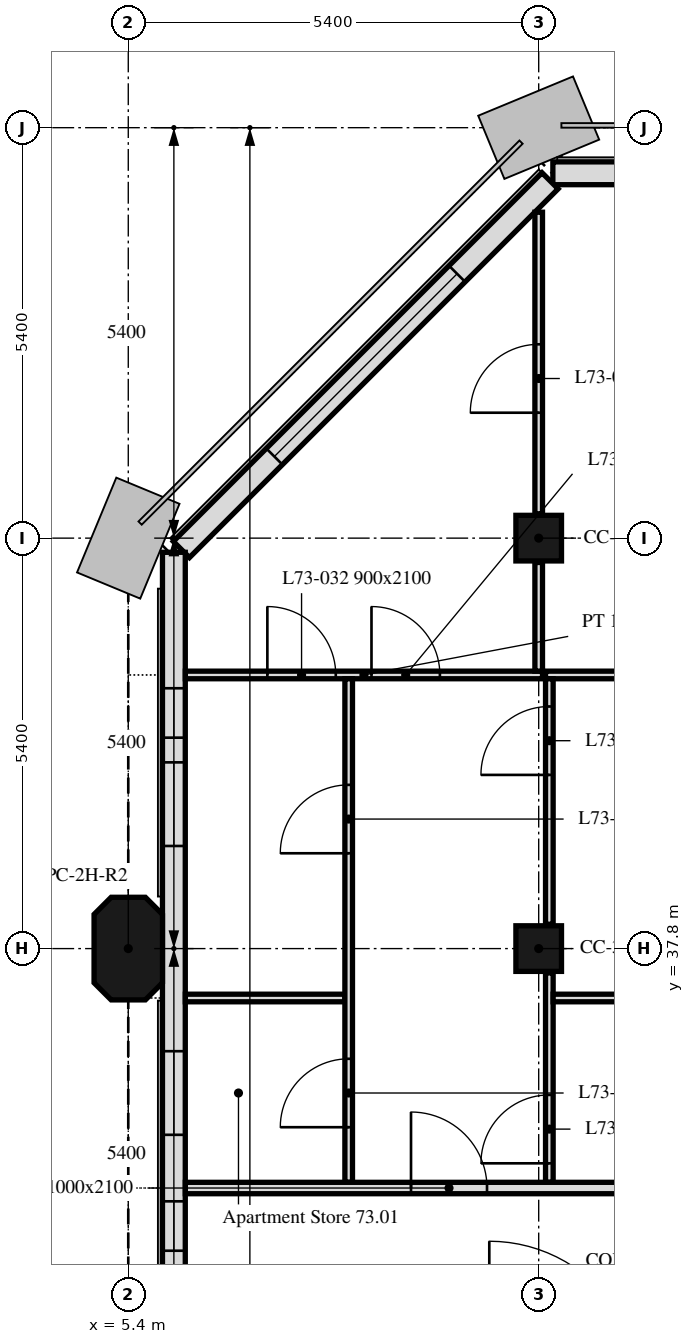
"""IFC4 building model, lengths in metres.
Left out: names, types, materials, properties, quantities, classifications, styles, units other than length and angle.
Written with IfcOpenShell. Run it as: python <this file> out.ifc"""

import sys

from ifc_helpers import new_model, si_unit, direction, frame, frame_2d, origin, origin_2d, place, context, subcontext, project, spatial, polyline, rectangle, outline, extrude, element, fill, save


model = new_model("IFC4")
c1 = context("Model", 3, precision=1e-05, world=origin(), true_north=direction((0.0, 1.0)))
c2 = subcontext(c1, "Body", "Model", "MODEL_VIEW")
j1 = project(units=[si_unit("LENGTHUNIT", "METRE"), si_unit("PLANEANGLEUNIT", "RADIAN")], contexts=[c1])
p1 = place(None, origin())
s1 = spatial("IfcSite", under=j1, at=p1, CompositionType="ELEMENT")
p2 = place(p1, origin())
s2 = spatial("IfcBuilding", under=s1, at=p2, CompositionType="ELEMENT")
p3 = place(p2, frame((0.0, 0.0, 295.0)))
s3 = spatial("IfcBuildingStorey", under=s2, at=p3, CompositionType="ELEMENT", Elevation=295.0)
p4 = place(p3, frame((5.4, 37.8, 0.0), z_axis=(0.0, 0.0, 1.0), x_axis=(0.0, 1.0, 0.0)))
e1 = element("IfcColumn", 1, at=p4, inside=s3, PredefinedType="COLUMN", context=c2, shape_type="SweptSolid", body=[
    extrude(outline(polyline([(-0.45, -0.45), (0.45, -0.45), (0.675, -0.225), (0.675, 0.225), (0.45, 0.45), (-0.45, 0.45), (-0.675, 0.225), (-0.675, -0.225), (-0.45, -0.45)])), origin(), (0.0, 0.0, 1.0), 3.0),
])
for number, where, z_axis, x_axis in (
    (2, (10.8, 37.8, 0.0), (0.0, 0.0, 1.0), (1.0, 0.0, 0.0)),
    (3, (10.8, 43.2, 0.0), (0.0, 0.0, 1.0), (1.0, 0.0, 0.0)),
):
    element("IfcColumn", number, at=place(p3, frame(where, z_axis=z_axis, x_axis=x_axis)), inside=s3, PredefinedType="COLUMN", context=c2, shape_type="SweptSolid", body=[
        extrude(rectangle(XDim=0.6, YDim=0.6, at=origin_2d()), origin(), (0.0, 0.0, 1.0), 3.0),
    ])
p5 = place(p3, frame((43.014, 48.0, 0.0), z_axis=(0.0, 0.0, 1.0), x_axis=(-1.0, 0.0, 0.0)))
e4 = element("IfcWall", 4, at=p5, inside=s3, PredefinedType="SOLIDWALL", context=c2, shape_type="SweptSolid", body=[
    extrude(rectangle(XDim=32.027, YDim=0.3, at=frame_2d((16.014, 0.0))), origin(), (0.0, 0.0, 1.0), 3.0),
])
p6 = place(p5, frame((0.814, 0.0, 0.9)))
e5 = element("IfcOpeningElement", 5, at=p6, cuts=e4, PredefinedType="OPENING", context=c2, shape_type="SweptSolid", body=[
    extrude(rectangle(XDim=3.4, YDim=1.7, at=frame_2d((1.7, 0.85))), frame((0.0, 0.16, 0.0), z_axis=(0.0, -1.0, 0.0), x_axis=(1.0, 0.0, 0.0)), (0.0, 0.0, 1.0), 0.32),
])
p7 = place(p5, frame((6.564, 0.0, 0.9)))
e6 = element("IfcOpeningElement", 6, at=p7, cuts=e4, PredefinedType="OPENING", context=c2, shape_type="SweptSolid", body=[
    extrude(rectangle(XDim=1.1, YDim=1.7, at=frame_2d((0.55, 0.85))), frame((0.0, 0.16, 0.0), z_axis=(0.0, -1.0, 0.0), x_axis=(1.0, 0.0, 0.0)), (0.0, 0.0, 1.0), 0.32),
])
p8 = place(p5, frame((11.614, 0.0, 0.9)))
e7 = element("IfcOpeningElement", 7, at=p8, cuts=e4, PredefinedType="OPENING", context=c2, shape_type="SweptSolid", body=[
    extrude(rectangle(XDim=3.4, YDim=1.7, at=frame_2d((1.7, 0.85))), frame((0.0, 0.16, 0.0), z_axis=(0.0, -1.0, 0.0), x_axis=(1.0, 0.0, 0.0)), (0.0, 0.0, 1.0), 0.32),
])
p9 = place(p5, frame((17.364, 0.0, 0.9)))
e8 = element("IfcOpeningElement", 8, at=p9, cuts=e4, PredefinedType="OPENING", context=c2, shape_type="SweptSolid", body=[
    extrude(rectangle(XDim=1.1, YDim=1.7, at=frame_2d((0.55, 0.85))), frame((0.0, 0.16, 0.0), z_axis=(0.0, -1.0, 0.0), x_axis=(1.0, 0.0, 0.0)), (0.0, 0.0, 1.0), 0.32),
])
p10 = place(p5, frame((22.414, 0.0, 0.9)))
e9 = element("IfcOpeningElement", 9, at=p10, cuts=e4, PredefinedType="OPENING", context=c2, shape_type="SweptSolid", body=[
    extrude(rectangle(XDim=3.4, YDim=1.7, at=frame_2d((1.7, 0.85))), frame((0.0, 0.16, 0.0), z_axis=(0.0, -1.0, 0.0), x_axis=(1.0, 0.0, 0.0)), (0.0, 0.0, 1.0), 0.32),
])
p11 = place(p5, frame((28.164, 0.0, 0.9)))
e10 = element("IfcOpeningElement", 10, at=p11, cuts=e4, PredefinedType="OPENING", context=c2, shape_type="SweptSolid", body=[
    extrude(rectangle(XDim=1.1, YDim=1.7, at=frame_2d((0.55, 0.85))), frame((0.0, 0.16, 0.0), z_axis=(0.0, -1.0, 0.0), x_axis=(1.0, 0.0, 0.0)), (0.0, 0.0, 1.0), 0.32),
])
p12 = place(p3, frame((10.949, 47.901, 0.0), z_axis=(0.0, 0.0, 1.0), x_axis=(-0.707106781187, -0.707106781187, 0.0)))
e11 = element("IfcWall", 11, at=p12, inside=s3, PredefinedType="SOLIDWALL", context=c2, shape_type="SweptSolid", body=[
    extrude(rectangle(XDim=6.86, YDim=0.3, at=frame_2d((3.43, 0.0))), origin(), (0.0, 0.0, 1.0), 3.0),
])
p13 = place(p12, frame((1.73, 0.0, 0.9)))
e12 = element("IfcOpeningElement", 12, at=p13, cuts=e11, PredefinedType="OPENING", context=c2, shape_type="SweptSolid", body=[
    extrude(rectangle(XDim=3.4, YDim=1.7, at=frame_2d((1.7, 0.85))), frame((0.0, 0.16, 0.0), z_axis=(0.0, -1.0, 0.0), x_axis=(1.0, 0.0, 0.0)), (0.0, 0.0, 1.0), 0.32),
])
p14 = place(p3, frame((6.0, 43.014, 0.0), z_axis=(0.0, 0.0, 1.0), x_axis=(0.0, -1.0, 0.0)))
e13 = element("IfcWall", 13, at=p14, inside=s3, PredefinedType="SOLIDWALL", context=c2, shape_type="SweptSolid", body=[
    extrude(rectangle(XDim=10.614, YDim=0.3, at=frame_2d((5.307, 0.0))), origin(), (0.0, 0.0, 1.0), 3.0),
])
p15 = place(p14, frame((1.789, 0.0, 0.9)))
e14 = element("IfcOpeningElement", 14, at=p15, cuts=e13, PredefinedType="OPENING", context=c2, shape_type="SweptSolid", body=[
    extrude(rectangle(XDim=0.65, YDim=1.7, at=frame_2d((0.325, 0.85))), frame((0.0, 0.16, 0.0), z_axis=(0.0, -1.0, 0.0), x_axis=(1.0, 0.0, 0.0)), (0.0, 0.0, 1.0), 0.32),
])
p16 = place(p14, frame((2.764, 0.0, 0.9)))
e15 = element("IfcOpeningElement", 15, at=p16, cuts=e13, PredefinedType="OPENING", context=c2, shape_type="SweptSolid", body=[
    extrude(rectangle(XDim=1.1, YDim=1.7, at=frame_2d((0.55, 0.85))), frame((0.0, 0.16, 0.0), z_axis=(0.0, -1.0, 0.0), x_axis=(1.0, 0.0, 0.0)), (0.0, 0.0, 1.0), 0.32),
])
p17 = place(p14, frame((6.564, 0.0, 0.9)))
e16 = element("IfcOpeningElement", 16, at=p17, cuts=e13, PredefinedType="OPENING", context=c2, shape_type="SweptSolid", body=[
    extrude(rectangle(XDim=1.1, YDim=1.7, at=frame_2d((0.55, 0.85))), frame((0.0, 0.16, 0.0), z_axis=(0.0, -1.0, 0.0), x_axis=(1.0, 0.0, 0.0)), (0.0, 0.0, 1.0), 0.32),
])
p18 = place(p14, frame((8.539, 0.0, 0.9)))
e17 = element("IfcOpeningElement", 17, at=p18, cuts=e13, PredefinedType="OPENING", context=c2, shape_type="SweptSolid", body=[
    extrude(rectangle(XDim=0.65, YDim=1.7, at=frame_2d((0.325, 0.85))), frame((0.0, 0.16, 0.0), z_axis=(0.0, -1.0, 0.0), x_axis=(1.0, 0.0, 0.0)), (0.0, 0.0, 1.0), 0.32),
])
p19 = place(p3, frame((6.151, 41.4, 0.0), z_axis=(0.0, 0.0, 1.0), x_axis=(1.0, 0.0, 0.0)))
e18 = element("IfcWall", 18, at=p19, inside=s3, PredefinedType="PARTITIONING", context=c2, shape_type="SweptSolid", body=[
    extrude(rectangle(XDim=4.699, YDim=0.1, at=frame_2d((2.35, 0.0))), origin(), (0.0, 0.0, 1.0), 3.0),
])
p20 = place(p19, frame((1.079, 0.0, 0.0)))
e19 = element("IfcOpeningElement", 19, at=p20, cuts=e18, PredefinedType="OPENING", context=c2, shape_type="SweptSolid", body=[
    extrude(rectangle(XDim=0.9, YDim=2.1, at=frame_2d((0.45, 1.05))), frame((0.0, 0.05, 0.0), z_axis=(0.0, -1.0, 0.0), x_axis=(1.0, 0.0, 0.0)), (0.0, 0.0, 1.0), 0.1),
])
p21 = place(p19, frame((2.449, 0.0, 0.0)))
e20 = element("IfcOpeningElement", 20, at=p21, cuts=e18, PredefinedType="OPENING", context=c2, shape_type="SweptSolid", body=[
    extrude(rectangle(XDim=0.9, YDim=2.1, at=frame_2d((0.45, 1.05))), frame((0.0, 0.05, 0.0), z_axis=(0.0, -1.0, 0.0), x_axis=(1.0, 0.0, 0.0)), (0.0, 0.0, 1.0), 0.1),
])
p22 = place(p3, frame((10.8, 41.45, 0.0), z_axis=(0.0, 0.0, 1.0), x_axis=(0.0, 1.0, 0.0)))
e21 = element("IfcWall", 21, at=p22, inside=s3, PredefinedType="PARTITIONING", context=c2, shape_type="SweptSolid", body=[
    extrude(rectangle(XDim=1.43, YDim=0.1, at=frame_2d((0.715, 0.0))), origin(), (0.0, 0.0, 1.0), 3.0),
])
p23 = place(p3, frame((10.8, 43.52, 0.0), z_axis=(0.0, 0.0, 1.0), x_axis=(0.0, 1.0, 0.0)))
e22 = element("IfcWall", 22, at=p23, inside=s3, PredefinedType="PARTITIONING", context=c2, shape_type="SweptSolid", body=[
    extrude(rectangle(XDim=3.968, YDim=0.1, at=frame_2d((1.984, 0.0))), origin(), (0.0, 0.0, 1.0), 3.0),
])
p24 = place(p23, frame((1.33, 0.0, 0.0)))
e23 = element("IfcOpeningElement", 23, at=p24, cuts=e22, PredefinedType="OPENING", context=c2, shape_type="SweptSolid", body=[
    extrude(rectangle(XDim=0.9, YDim=2.1, at=frame_2d((0.45, 1.05))), frame((0.0, 0.05, 0.0), z_axis=(0.0, -1.0, 0.0), x_axis=(1.0, 0.0, 0.0)), (0.0, 0.0, 1.0), 0.1),
])
p25 = place(p3, frame((10.89, 41.4, 0.0), z_axis=(0.0, 0.0, 1.0), x_axis=(1.0, 0.0, 0.0)))
e24 = element("IfcWall", 24, at=p25, inside=s3, PredefinedType="PARTITIONING", context=c2, shape_type="SweptSolid", body=[
    extrude(rectangle(XDim=5.235, YDim=0.1, at=frame_2d((2.618, 0.0))), origin(), (0.0, 0.0, 1.0), 3.0),
])
p26 = place(p25, frame((3.15, 0.0, 0.0)))
e25 = element("IfcOpeningElement", 25, at=p26, cuts=e24, PredefinedType="OPENING", context=c2, shape_type="SweptSolid", body=[
    extrude(rectangle(XDim=0.9, YDim=2.1, at=frame_2d((0.45, 1.05))), frame((0.0, 0.05, 0.0), z_axis=(0.0, -1.0, 0.0), x_axis=(1.0, 0.0, 0.0)), (0.0, 0.0, 1.0), 0.1),
])
p27 = place(p3, frame((6.151, 37.15, 0.0), z_axis=(0.0, 0.0, 1.0), x_axis=(1.0, 0.0, 0.0)))
e26 = element("IfcWall", 26, at=p27, inside=s3, PredefinedType="PARTITIONING", context=c2, shape_type="SweptSolid", body=[
    extrude(rectangle(XDim=2.099, YDim=0.1, at=frame_2d((1.05, 0.0))), origin(), (0.0, 0.0, 1.0), 3.0),
])
p28 = place(p3, frame((8.3, 34.725, 0.0), z_axis=(0.0, 0.0, 1.0), x_axis=(0.0, 1.0, 0.0)))
e27 = element("IfcWall", 27, at=p28, inside=s3, PredefinedType="PARTITIONING", context=c2, shape_type="SweptSolid", body=[
    extrude(rectangle(XDim=6.625, YDim=0.1, at=frame_2d((3.312, 0.0))), origin(), (0.0, 0.0, 1.0), 3.0),
])
p29 = place(p28, frame((0.725, 0.0, 0.0)))
e28 = element("IfcOpeningElement", 28, at=p29, cuts=e27, PredefinedType="OPENING", context=c2, shape_type="SweptSolid", body=[
    extrude(rectangle(XDim=0.9, YDim=2.1, at=frame_2d((0.45, 1.05))), frame((0.0, 0.05, 0.0), z_axis=(0.0, -1.0, 0.0), x_axis=(1.0, 0.0, 0.0)), (0.0, 0.0, 1.0), 0.1),
])
p30 = place(p28, frame((4.329, 0.0, 0.0)))
e29 = element("IfcOpeningElement", 29, at=p30, cuts=e27, PredefinedType="OPENING", context=c2, shape_type="SweptSolid", body=[
    extrude(rectangle(XDim=0.9, YDim=2.1, at=frame_2d((0.45, 1.05))), frame((0.0, 0.05, 0.0), z_axis=(0.0, -1.0, 0.0), x_axis=(1.0, 0.0, 0.0)), (0.0, 0.0, 1.0), 0.1),
])
p31 = place(p3, frame((10.94, 34.725, 0.0), z_axis=(0.0, 0.0, 1.0), x_axis=(0.0, 1.0, 0.0)))
e30 = element("IfcWall", 30, at=p31, inside=s3, PredefinedType="PARTITIONING", context=c2, shape_type="SweptSolid", body=[
    extrude(rectangle(XDim=2.755, YDim=0.1, at=frame_2d((1.377, 0.0))), origin(), (0.0, 0.0, 1.0), 3.0),
])
p32 = place(p31, frame((0.25, 0.0, 0.0)))
e31 = element("IfcOpeningElement", 31, at=p32, cuts=e30, PredefinedType="OPENING", context=c2, shape_type="SweptSolid", body=[
    extrude(rectangle(XDim=0.9, YDim=2.1, at=frame_2d((0.45, 1.05))), frame((0.0, 0.05, 0.0), z_axis=(0.0, -1.0, 0.0), x_axis=(1.0, 0.0, 0.0)), (0.0, 0.0, 1.0), 0.1),
])
p33 = place(p3, frame((10.94, 38.12, 0.0), z_axis=(0.0, 0.0, 1.0), x_axis=(0.0, 1.0, 0.0)))
e32 = element("IfcWall", 32, at=p33, inside=s3, PredefinedType="PARTITIONING", context=c2, shape_type="SweptSolid", body=[
    extrude(rectangle(XDim=3.23, YDim=0.1, at=frame_2d((1.615, 0.0))), origin(), (0.0, 0.0, 1.0), 3.0),
])
p34 = place(p33, frame((1.965, 0.0, 0.0)))
e33 = element("IfcOpeningElement", 33, at=p34, cuts=e32, PredefinedType="OPENING", context=c2, shape_type="SweptSolid", body=[
    extrude(rectangle(XDim=0.9, YDim=2.1, at=frame_2d((0.45, 1.05))), frame((0.0, 0.05, 0.0), z_axis=(0.0, -1.0, 0.0), x_axis=(1.0, 0.0, 0.0)), (0.0, 0.0, 1.0), 0.1),
])
p35 = place(p3, frame((10.99, 37.15, 0.0), z_axis=(0.0, 0.0, 1.0), x_axis=(1.0, 0.0, 0.0)))
e34 = element("IfcWall", 34, at=p35, inside=s3, PredefinedType="PARTITIONING", context=c2, shape_type="SweptSolid", body=[
    extrude(rectangle(XDim=5.135, YDim=0.1, at=frame_2d((2.567, 0.0))), origin(), (0.0, 0.0, 1.0), 3.0),
])
p36 = place(p35, frame((3.12, 0.0, 0.0)))
e35 = element("IfcOpeningElement", 35, at=p36, cuts=e34, PredefinedType="OPENING", context=c2, shape_type="SweptSolid", body=[
    extrude(rectangle(XDim=0.9, YDim=2.1, at=frame_2d((0.45, 1.05))), frame((0.0, 0.05, 0.0), z_axis=(0.0, -1.0, 0.0), x_axis=(1.0, 0.0, 0.0)), (0.0, 0.0, 1.0), 0.1),
])
p37 = place(p3, frame((6.151, 34.65, 0.0), z_axis=(0.0, 0.0, 1.0), x_axis=(1.0, 0.0, 0.0)))
e36 = element("IfcWall", 36, at=p37, inside=s3, PredefinedType="PARTITIONING", context=c2, shape_type="SweptSolid", body=[
    extrude(rectangle(XDim=41.698, YDim=0.15, at=frame_2d((20.849, 0.0))), origin(), (0.0, 0.0, 1.0), 2.4),
])
p38 = place(p37, frame((2.969, 0.0, 0.0)))
e37 = element("IfcOpeningElement", 37, at=p38, cuts=e36, PredefinedType="OPENING", context=c2, shape_type="SweptSolid", body=[
    extrude(rectangle(XDim=1.0, YDim=2.1, at=frame_2d((0.5, 1.05))), frame((0.0, 0.075, 0.0), z_axis=(0.0, -1.0, 0.0), x_axis=(1.0, 0.0, 0.0)), (0.0, 0.0, 1.0), 0.15),
])
p39 = place(p37, frame((12.944, 0.0, 0.0)))
e38 = element("IfcOpeningElement", 38, at=p39, cuts=e36, PredefinedType="OPENING", context=c2, shape_type="SweptSolid", body=[
    extrude(rectangle(XDim=1.0, YDim=2.1, at=frame_2d((0.5, 1.05))), frame((0.0, 0.075, 0.0), z_axis=(0.0, -1.0, 0.0), x_axis=(1.0, 0.0, 0.0)), (0.0, 0.0, 1.0), 0.15),
])
p40 = place(p37, frame((24.444, 0.0, 0.0)))
e39 = element("IfcOpeningElement", 39, at=p40, cuts=e36, PredefinedType="OPENING", context=c2, shape_type="SweptSolid", body=[
    extrude(rectangle(XDim=1.0, YDim=2.1, at=frame_2d((0.5, 1.05))), frame((0.0, 0.075, 0.0), z_axis=(0.0, -1.0, 0.0), x_axis=(1.0, 0.0, 0.0)), (0.0, 0.0, 1.0), 0.15),
])
p41 = place(p37, frame((34.964, 0.0, 0.0)))
e40 = element("IfcOpeningElement", 40, at=p41, cuts=e36, PredefinedType="OPENING", context=c2, shape_type="SweptSolid", body=[
    extrude(rectangle(XDim=1.0, YDim=2.1, at=frame_2d((0.5, 1.05))), frame((0.0, 0.075, 0.0), z_axis=(0.0, -1.0, 0.0), x_axis=(1.0, 0.0, 0.0)), (0.0, 0.0, 1.0), 0.15),
])
p42 = place(p13, origin())
e41 = element("IfcWindow", 41, at=p42, inside=s3, PartitioningType="SINGLE_PANEL", PredefinedType="WINDOW", context=c2, shape_type="SweptSolid", body=[
    extrude(rectangle(XDim=3.4, YDim=1.7, at=frame_2d((1.7, 0.85))), frame((0.0, 0.03, 0.0), z_axis=(0.0, -1.0, 0.0), x_axis=(1.0, 0.0, 0.0)), (0.0, 0.0, 1.0), 0.06),
])
fill(e12, e41)
p43 = place(p15, origin())
e42 = element("IfcWindow", 42, at=p43, inside=s3, PartitioningType="SINGLE_PANEL", PredefinedType="WINDOW", context=c2, shape_type="SweptSolid", body=[
    extrude(rectangle(XDim=0.65, YDim=1.7, at=frame_2d((0.325, 0.85))), frame((0.0, 0.03, 0.0), z_axis=(0.0, -1.0, 0.0), x_axis=(1.0, 0.0, 0.0)), (0.0, 0.0, 1.0), 0.06),
])
fill(e14, e42)
p44 = place(p16, origin())
e43 = element("IfcWindow", 43, at=p44, inside=s3, PartitioningType="SINGLE_PANEL", PredefinedType="WINDOW", context=c2, shape_type="SweptSolid", body=[
    extrude(rectangle(XDim=1.1, YDim=1.7, at=frame_2d((0.55, 0.85))), frame((0.0, 0.03, 0.0), z_axis=(0.0, -1.0, 0.0), x_axis=(1.0, 0.0, 0.0)), (0.0, 0.0, 1.0), 0.06),
])
fill(e15, e43)
p45 = place(p17, origin())
e44 = element("IfcWindow", 44, at=p45, inside=s3, PartitioningType="SINGLE_PANEL", PredefinedType="WINDOW", context=c2, shape_type="SweptSolid", body=[
    extrude(rectangle(XDim=1.1, YDim=1.7, at=frame_2d((0.55, 0.85))), frame((0.0, 0.03, 0.0), z_axis=(0.0, -1.0, 0.0), x_axis=(1.0, 0.0, 0.0)), (0.0, 0.0, 1.0), 0.06),
])
fill(e16, e44)
p46 = place(p18, origin())
e45 = element("IfcWindow", 45, at=p46, inside=s3, PartitioningType="SINGLE_PANEL", PredefinedType="WINDOW", context=c2, shape_type="SweptSolid", body=[
    extrude(rectangle(XDim=0.65, YDim=1.7, at=frame_2d((0.325, 0.85))), frame((0.0, 0.03, 0.0), z_axis=(0.0, -1.0, 0.0), x_axis=(1.0, 0.0, 0.0)), (0.0, 0.0, 1.0), 0.06),
])
fill(e17, e45)
p47 = place(p29, origin())
e46 = element("IfcDoor", 46, at=p47, inside=s3, OperationType="SINGLE_SWING_LEFT", PredefinedType="DOOR", context=c2, shape_type="SweptSolid", body=[
    extrude(rectangle(XDim=0.9, YDim=2.1, at=frame_2d((0.45, 1.05))), frame((0.0, 0.025, 0.0), z_axis=(0.0, -1.0, 0.0), x_axis=(1.0, 0.0, 0.0)), (0.0, 0.0, 1.0), 0.05),
])
fill(e28, e46)
p48 = place(p34, origin())
e47 = element("IfcDoor", 47, at=p48, inside=s3, OperationType="SINGLE_SWING_RIGHT", PredefinedType="DOOR", context=c2, shape_type="SweptSolid", body=[
    extrude(rectangle(XDim=0.9, YDim=2.1, at=frame_2d((0.45, 1.05))), frame((0.0, 0.025, 0.0), z_axis=(0.0, -1.0, 0.0), x_axis=(1.0, 0.0, 0.0)), (0.0, 0.0, 1.0), 0.05),
])
fill(e33, e47)
p49 = place(p32, origin())
e48 = element("IfcDoor", 48, at=p49, inside=s3, OperationType="SINGLE_SWING_RIGHT", PredefinedType="DOOR", context=c2, shape_type="SweptSolid", body=[
    extrude(rectangle(XDim=0.9, YDim=2.1, at=frame_2d((0.45, 1.05))), frame((0.0, 0.025, 0.0), z_axis=(0.0, -1.0, 0.0), x_axis=(1.0, 0.0, 0.0)), (0.0, 0.0, 1.0), 0.05),
])
fill(e31, e48)
p50 = place(p24, origin())
e49 = element("IfcDoor", 49, at=p50, inside=s3, OperationType="SINGLE_SWING_RIGHT", PredefinedType="DOOR", context=c2, shape_type="SweptSolid", body=[
    extrude(rectangle(XDim=0.9, YDim=2.1, at=frame_2d((0.45, 1.05))), frame((0.0, 0.025, 0.0), z_axis=(0.0, -1.0, 0.0), x_axis=(1.0, 0.0, 0.0)), (0.0, 0.0, 1.0), 0.05),
])
fill(e23, e49)
p51 = place(p20, origin())
e50 = element("IfcDoor", 50, at=p51, inside=s3, OperationType="SINGLE_SWING_RIGHT", PredefinedType="DOOR", context=c2, shape_type="SweptSolid", body=[
    extrude(rectangle(XDim=0.9, YDim=2.1, at=frame_2d((0.45, 1.05))), frame((0.0, 0.025, 0.0), z_axis=(0.0, -1.0, 0.0), x_axis=(1.0, 0.0, 0.0)), (0.0, 0.0, 1.0), 0.05),
])
fill(e19, e50)
p52 = place(p30, origin())
e51 = element("IfcDoor", 51, at=p52, inside=s3, OperationType="SINGLE_SWING_RIGHT", PredefinedType="DOOR", context=c2, shape_type="SweptSolid", body=[
    extrude(rectangle(XDim=0.9, YDim=2.1, at=frame_2d((0.45, 1.05))), frame((0.0, 0.025, 0.0), z_axis=(0.0, -1.0, 0.0), x_axis=(1.0, 0.0, 0.0)), (0.0, 0.0, 1.0), 0.05),
])
fill(e29, e51)
p53 = place(p21, origin())
e52 = element("IfcDoor", 52, at=p53, inside=s3, OperationType="SINGLE_SWING_LEFT", PredefinedType="DOOR", context=c2, shape_type="SweptSolid", body=[
    extrude(rectangle(XDim=0.9, YDim=2.1, at=frame_2d((0.45, 1.05))), frame((0.0, 0.025, 0.0), z_axis=(0.0, -1.0, 0.0), x_axis=(1.0, 0.0, 0.0)), (0.0, 0.0, 1.0), 0.05),
])
fill(e20, e52)
p54 = place(p38, origin())
e53 = element("IfcDoor", 53, at=p54, inside=s3, OperationType="SINGLE_SWING_RIGHT", PredefinedType="DOOR", context=c2, shape_type="SweptSolid", body=[
    extrude(rectangle(XDim=1.0, YDim=2.1, at=frame_2d((0.5, 1.05))), frame((0.0, 0.025, 0.0), z_axis=(0.0, -1.0, 0.0), x_axis=(1.0, 0.0, 0.0)), (0.0, 0.0, 1.0), 0.05),
])
fill(e37, e53)
save(model, sys.argv[1])
